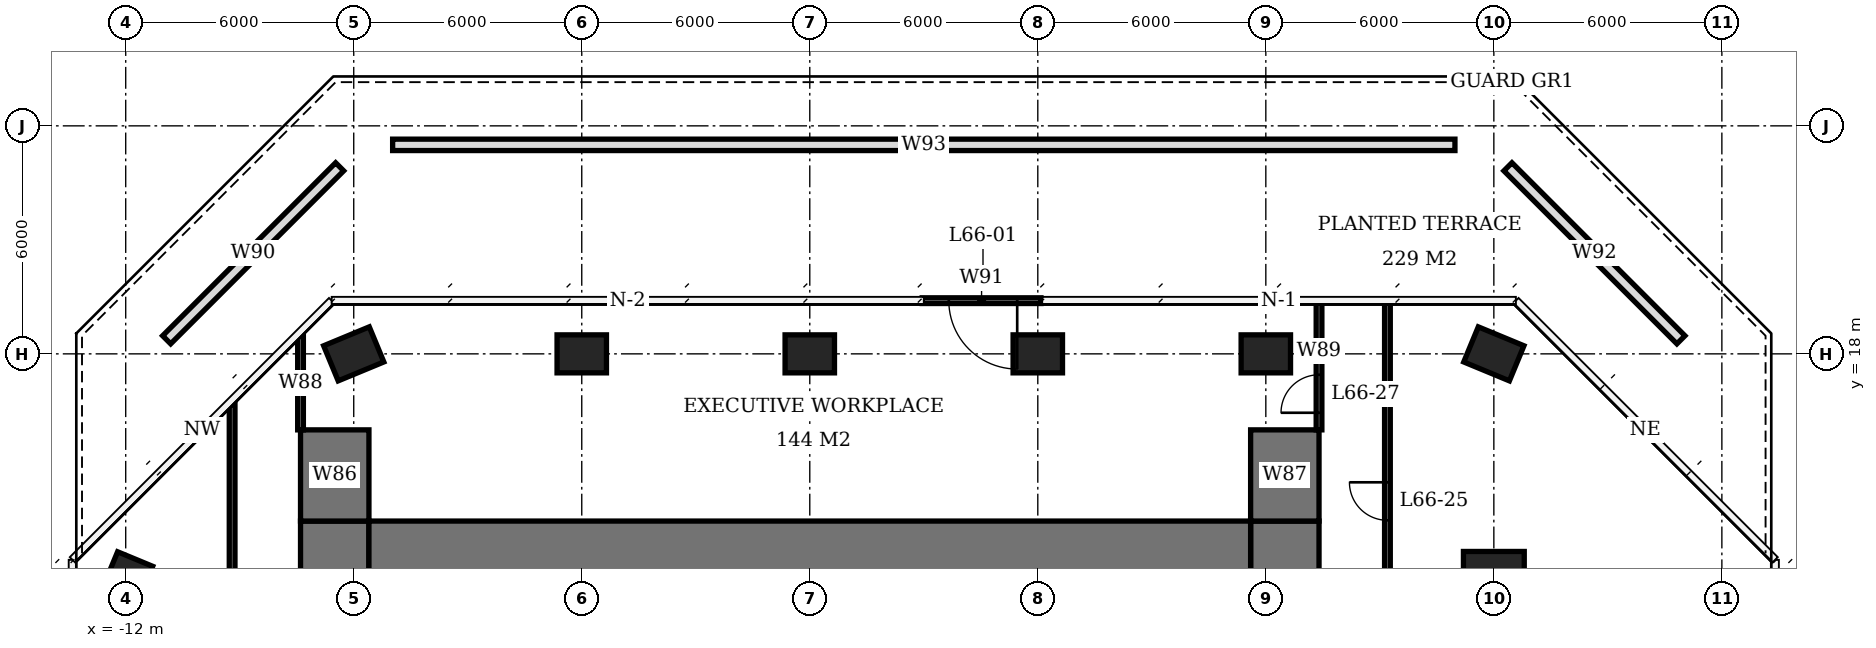
"""IFC4 building model, lengths in metres.
Left out: names, types, materials, properties, quantities, classifications, styles, units other than length and angle.
Written with IfcOpenShell. Run it as: python <this file> out.ifc"""

import sys

from ifc_helpers import new_model, si_unit, direction, frame, frame_2d, origin, origin_2d, place, context, subcontext, project, spatial, rectangle, extrude, element, fill, save


model = new_model("IFC4")
c1 = context("Model", 3, precision=1e-05, world=origin(), true_north=direction((0.0, 1.0)))
c2 = subcontext(c1, "Body", "Model", "MODEL_VIEW")
j1 = project(units=[si_unit("LENGTHUNIT", "METRE"), si_unit("PLANEANGLEUNIT", "RADIAN")], contexts=[c1])
p1 = place(None, origin())
s1 = spatial("IfcSite", under=j1, at=p1, CompositionType="ELEMENT")
p2 = place(p1, origin())
s2 = spatial("IfcBuilding", under=s1, at=p2, CompositionType="ELEMENT")
p3 = place(p2, frame((0.0, 0.0, 268.4)))
s3 = spatial("IfcBuildingStorey", under=s2, at=p3, CompositionType="ELEMENT", Elevation=268.4)
for number, where, z_axis, x_axis in (
    (1, (-12.0, 12.0, 0.0), (0.0, 0.0, 1.0), (0.383, 0.924, 0.0)),
    (2, (-6.0, 18.0, 0.0), (0.0, 0.0, 1.0), (0.924, 0.383, 0.0)),
    (3, (0.0, 18.0, 0.0), (0.0, 0.0, 1.0), (1.0, 0.0, 0.0)),
    (4, (6.0, 18.0, 0.0), (0.0, 0.0, 1.0), (1.0, 0.0, 0.0)),
    (5, (12.0, 18.0, 0.0), (0.0, 0.0, 1.0), (1.0, 0.0, 0.0)),
    (6, (18.0, 18.0, 0.0), (0.0, 0.0, 1.0), (1.0, 0.0, 0.0)),
):
    element("IfcColumn", number, at=place(p3, frame(where, z_axis=z_axis, x_axis=x_axis)), inside=s3, PredefinedType="COLUMN", context=c2, shape_type="SweptSolid", body=[
        extrude(rectangle(XDim=1.3, YDim=1.0, at=origin_2d()), origin(), (0.0, 0.0, 1.0), 3.9),
    ])
p4 = place(p3, frame((24.0, 12.0, 0.0), z_axis=(0.0, 0.0, 1.0), x_axis=(1.0, 0.0, 0.0)))
e7 = element("IfcColumn", 7, at=p4, inside=s3, PredefinedType="COLUMN", context=c2, shape_type="SweptSolid", body=[
    extrude(rectangle(XDim=1.6, YDim=1.6, at=origin_2d()), origin(), (0.0, 0.0, 1.0), 3.9),
])
p5 = place(p3, frame((24.0, 18.0, 0.0), z_axis=(0.0, 0.0, 1.0), x_axis=(0.923879532511, -0.382683432365, 0.0)))
e8 = element("IfcColumn", 8, at=p5, inside=s3, PredefinedType="COLUMN", context=c2, shape_type="SweptSolid", body=[
    extrude(rectangle(XDim=1.3, YDim=1.0, at=origin_2d()), origin(), (0.0, 0.0, 1.0), 3.9),
])
p6 = place(p3, frame((-5.6, 12.6, 0.0), z_axis=(0.0, 0.0, 1.0), x_axis=(1.0, 0.0, 0.0)))
e9 = element("IfcWall", 9, at=p6, inside=s3, PredefinedType="SHEAR", context=c2, shape_type="SweptSolid", body=[
    extrude(rectangle(XDim=23.2, YDim=2.0, at=frame_2d((11.6, 0.0))), origin(), (0.0, 0.0, 1.0), 3.9),
])
p7 = place(p3, frame((-6.5, -7.6, 0.0), z_axis=(0.0, 0.0, 1.0), x_axis=(0.0, 1.0, 0.0)))
e10 = element("IfcWall", 10, at=p7, inside=s3, PredefinedType="SHEAR", context=c2, shape_type="SweptSolid", body=[
    extrude(rectangle(XDim=21.2, YDim=1.8, at=frame_2d((10.6, 0.0))), origin(), (0.0, 0.0, 1.0), 3.9),
])
p8 = place(p7, frame((7.8, 0.0, 0.0)))
e11 = element("IfcOpeningElement", 11, at=p8, cuts=e10, PredefinedType="OPENING", context=c2, shape_type="SweptSolid", body=[
    extrude(rectangle(XDim=1.8, YDim=2.4, at=frame_2d((0.9, 1.2))), frame((0.0, 0.91, 0.0), z_axis=(0.0, -1.0, 0.0), x_axis=(1.0, 0.0, 0.0)), (0.0, 0.0, 1.0), 1.82),
])
p9 = place(p3, frame((18.5, -7.6, 0.0), z_axis=(0.0, 0.0, 1.0), x_axis=(0.0, 1.0, 0.0)))
e12 = element("IfcWall", 12, at=p9, inside=s3, PredefinedType="SHEAR", context=c2, shape_type="SweptSolid", body=[
    extrude(rectangle(XDim=21.2, YDim=1.8, at=frame_2d((10.6, 0.0))), origin(), (0.0, 0.0, 1.0), 3.9),
])
p10 = place(p9, frame((9.2, 0.0, 0.0)))
e13 = element("IfcOpeningElement", 13, at=p10, cuts=e12, PredefinedType="OPENING", context=c2, shape_type="SweptSolid", body=[
    extrude(rectangle(XDim=1.8, YDim=2.4, at=frame_2d((0.9, 1.2))), frame((0.0, 0.91, 0.0), z_axis=(0.0, -1.0, 0.0), x_axis=(1.0, 0.0, 0.0)), (0.0, 0.0, 1.0), 1.82),
])
for number, where, z_axis, x_axis in (
    (14, (-6.5, 13.6, 0.0), (0.0, 0.0, 1.0), (0.0, 1.0, 0.0)),
    (15, (18.5, 13.6, 0.0), (0.0, 0.0, 1.0), (0.0, 1.0, 0.0)),
):
    element("IfcWall", number, at=place(p3, frame(where, z_axis=z_axis, x_axis=x_axis)), inside=s3, PredefinedType="SHEAR", context=c2, shape_type="SweptSolid", body=[
        extrude(rectangle(XDim=2.4, YDim=1.8, at=frame_2d((1.2, 0.0))), origin(), (0.0, 0.0, 1.0), 3.9),
    ])
p11 = place(p3, frame((12.083, 19.4, 0.0), z_axis=(0.0, 0.0, 1.0), x_axis=(-1.0, 0.0, 0.0)))
e16 = element("IfcWall", 16, at=p11, inside=s3, PredefinedType="USERDEFINED", context=c2, shape_type="SweptSolid", body=[
    extrude(rectangle(XDim=3.126, YDim=0.15, at=frame_2d((1.563, 0.0))), origin(), (0.0, 0.0, 1.0), 3.9),
])
p12 = place(p11, frame((0.625, 0.0, 0.0)))
e17 = element("IfcOpeningElement", 17, at=p12, cuts=e16, PredefinedType="OPENING", context=c2, shape_type="SweptSolid", body=[
    extrude(rectangle(XDim=1.8, YDim=2.4, at=frame_2d((0.9, 1.2))), frame((0.0, 0.085, 0.0), z_axis=(0.0, -1.0, 0.0), x_axis=(1.0, 0.0, 0.0)), (0.0, 0.0, 1.0), 0.17),
])
p13 = place(p3, frame((-10.923, 18.37, 0.0), z_axis=(0.0, 0.0, 1.0), x_axis=(0.707106781187, 0.707106781187, 0.0)))
e18 = element("IfcWall", 18, at=p13, inside=s3, PredefinedType="USERDEFINED", context=c2, shape_type="SweptSolid", body=[
    extrude(rectangle(XDim=6.438, YDim=0.3, at=frame_2d((3.219, 0.0))), origin(), (0.0, 0.0, 1.0), 0.6),
])
p14 = place(p3, frame((-4.976, 23.5, 0.0), z_axis=(0.0, 0.0, 1.0), x_axis=(1.0, 0.0, 0.0)))
e19 = element("IfcWall", 19, at=p14, inside=s3, PredefinedType="USERDEFINED", context=c2, shape_type="SweptSolid", body=[
    extrude(rectangle(XDim=27.953, YDim=0.3, at=frame_2d((13.976, 0.0))), origin(), (0.0, 0.0, 1.0), 0.6),
])
p15 = place(p3, frame((24.37, 22.923, 0.0), z_axis=(0.0, 0.0, 1.0), x_axis=(0.707106781187, -0.707106781187, 0.0)))
e20 = element("IfcWall", 20, at=p15, inside=s3, PredefinedType="USERDEFINED", context=c2, shape_type="SweptSolid", body=[
    extrude(rectangle(XDim=6.438, YDim=0.3, at=frame_2d((3.219, 0.0))), origin(), (0.0, 0.0, 1.0), 0.6),
])
p16 = place(p3, frame((-9.2, 1.575, 0.0), z_axis=(0.0, 0.0, 1.0), x_axis=(0.0, 1.0, 0.0)))
e21 = element("IfcWall", 21, at=p16, inside=s3, PredefinedType="PARTITIONING", context=c2, shape_type="SweptSolid", body=[
    extrude(rectangle(XDim=15.089, YDim=0.15, at=frame_2d((7.544, 0.0))), origin(), (0.0, 0.0, 1.0), 3.65),
])
p17 = place(p16, frame((4.724, 0.0, 0.0)))
e22 = element("IfcOpeningElement", 22, at=p17, cuts=e21, PredefinedType="OPENING", context=c2, shape_type="SweptSolid", body=[
    extrude(rectangle(XDim=1.0, YDim=2.4, at=frame_2d((0.5, 1.2))), frame((0.0, 0.085, 0.0), z_axis=(0.0, -1.0, 0.0), x_axis=(1.0, 0.0, 0.0)), (0.0, 0.0, 1.0), 0.17),
])
p18 = place(p3, frame((-7.4, 16.0, 0.0), z_axis=(0.0, 0.0, 1.0), x_axis=(0.0, 1.0, 0.0)))
e23 = element("IfcWall", 23, at=p18, inside=s3, PredefinedType="PARTITIONING", context=c2, shape_type="SweptSolid", body=[
    extrude(rectangle(XDim=2.464, YDim=0.15, at=frame_2d((1.232, 0.0))), origin(), (0.0, 0.0, 1.0), 3.65),
])
p19 = place(p3, frame((19.4, 16.0, 0.0), z_axis=(0.0, 0.0, 1.0), x_axis=(0.0, 1.0, 0.0)))
e24 = element("IfcWall", 24, at=p19, inside=s3, PredefinedType="PARTITIONING", context=c2, shape_type="SweptSolid", body=[
    extrude(rectangle(XDim=3.375, YDim=0.15, at=frame_2d((1.688, 0.0))), origin(), (0.0, 0.0, 1.0), 3.65),
])
p20 = place(p19, frame((0.45, 0.0, 0.0)))
e25 = element("IfcOpeningElement", 25, at=p20, cuts=e24, PredefinedType="OPENING", context=c2, shape_type="SweptSolid", body=[
    extrude(rectangle(XDim=1.0, YDim=2.1, at=frame_2d((0.5, 1.05))), frame((0.0, 0.085, 0.0), z_axis=(0.0, -1.0, 0.0), x_axis=(1.0, 0.0, 0.0)), (0.0, 0.0, 1.0), 0.17),
])
p21 = place(p3, frame((21.2, 4.575, 0.0), z_axis=(0.0, 0.0, 1.0), x_axis=(0.0, 1.0, 0.0)))
e26 = element("IfcWall", 26, at=p21, inside=s3, PredefinedType="PARTITIONING", context=c2, shape_type="SweptSolid", body=[
    extrude(rectangle(XDim=14.8, YDim=0.15, at=frame_2d((7.4, 0.0))), origin(), (0.0, 0.0, 1.0), 3.65),
])
p22 = place(p21, frame((9.045, 0.0, 0.0)))
e27 = element("IfcOpeningElement", 27, at=p22, cuts=e26, PredefinedType="OPENING", context=c2, shape_type="SweptSolid", body=[
    extrude(rectangle(XDim=1.0, YDim=2.4, at=frame_2d((0.5, 1.2))), frame((0.0, 0.085, 0.0), z_axis=(0.0, -1.0, 0.0), x_axis=(1.0, 0.0, 0.0)), (0.0, 0.0, 1.0), 0.17),
])
p23 = place(p12, origin())
e28 = element("IfcDoor", 28, at=p23, inside=s3, OperationType="DOUBLE_DOOR_SINGLE_SWING", PredefinedType="DOOR", context=c2, shape_type="SweptSolid", body=[
    extrude(rectangle(XDim=1.8, YDim=2.4, at=frame_2d((0.9, 1.2))), frame((0.0, 0.025, 0.0), z_axis=(0.0, -1.0, 0.0), x_axis=(1.0, 0.0, 0.0)), (0.0, 0.0, 1.0), 0.05),
])
fill(e17, e28)
p24 = place(p22, origin())
e29 = element("IfcDoor", 29, at=p24, inside=s3, OperationType="SINGLE_SWING_RIGHT", PredefinedType="DOOR", context=c2, shape_type="SweptSolid", body=[
    extrude(rectangle(XDim=1.0, YDim=2.4, at=frame_2d((0.5, 1.2))), frame((0.0, 0.025, 0.0), z_axis=(0.0, -1.0, 0.0), x_axis=(1.0, 0.0, 0.0)), (0.0, 0.0, 1.0), 0.05),
])
fill(e27, e29)
p25 = place(p20, origin())
e30 = element("IfcDoor", 30, at=p25, inside=s3, OperationType="SINGLE_SWING_LEFT", PredefinedType="DOOR", context=c2, shape_type="SweptSolid", body=[
    extrude(rectangle(XDim=1.0, YDim=2.1, at=frame_2d((0.5, 1.05))), frame((0.0, 0.025, 0.0), z_axis=(0.0, -1.0, 0.0), x_axis=(1.0, 0.0, 0.0)), (0.0, 0.0, 1.0), 0.05),
])
fill(e25, e30)
save(model, sys.argv[1])
